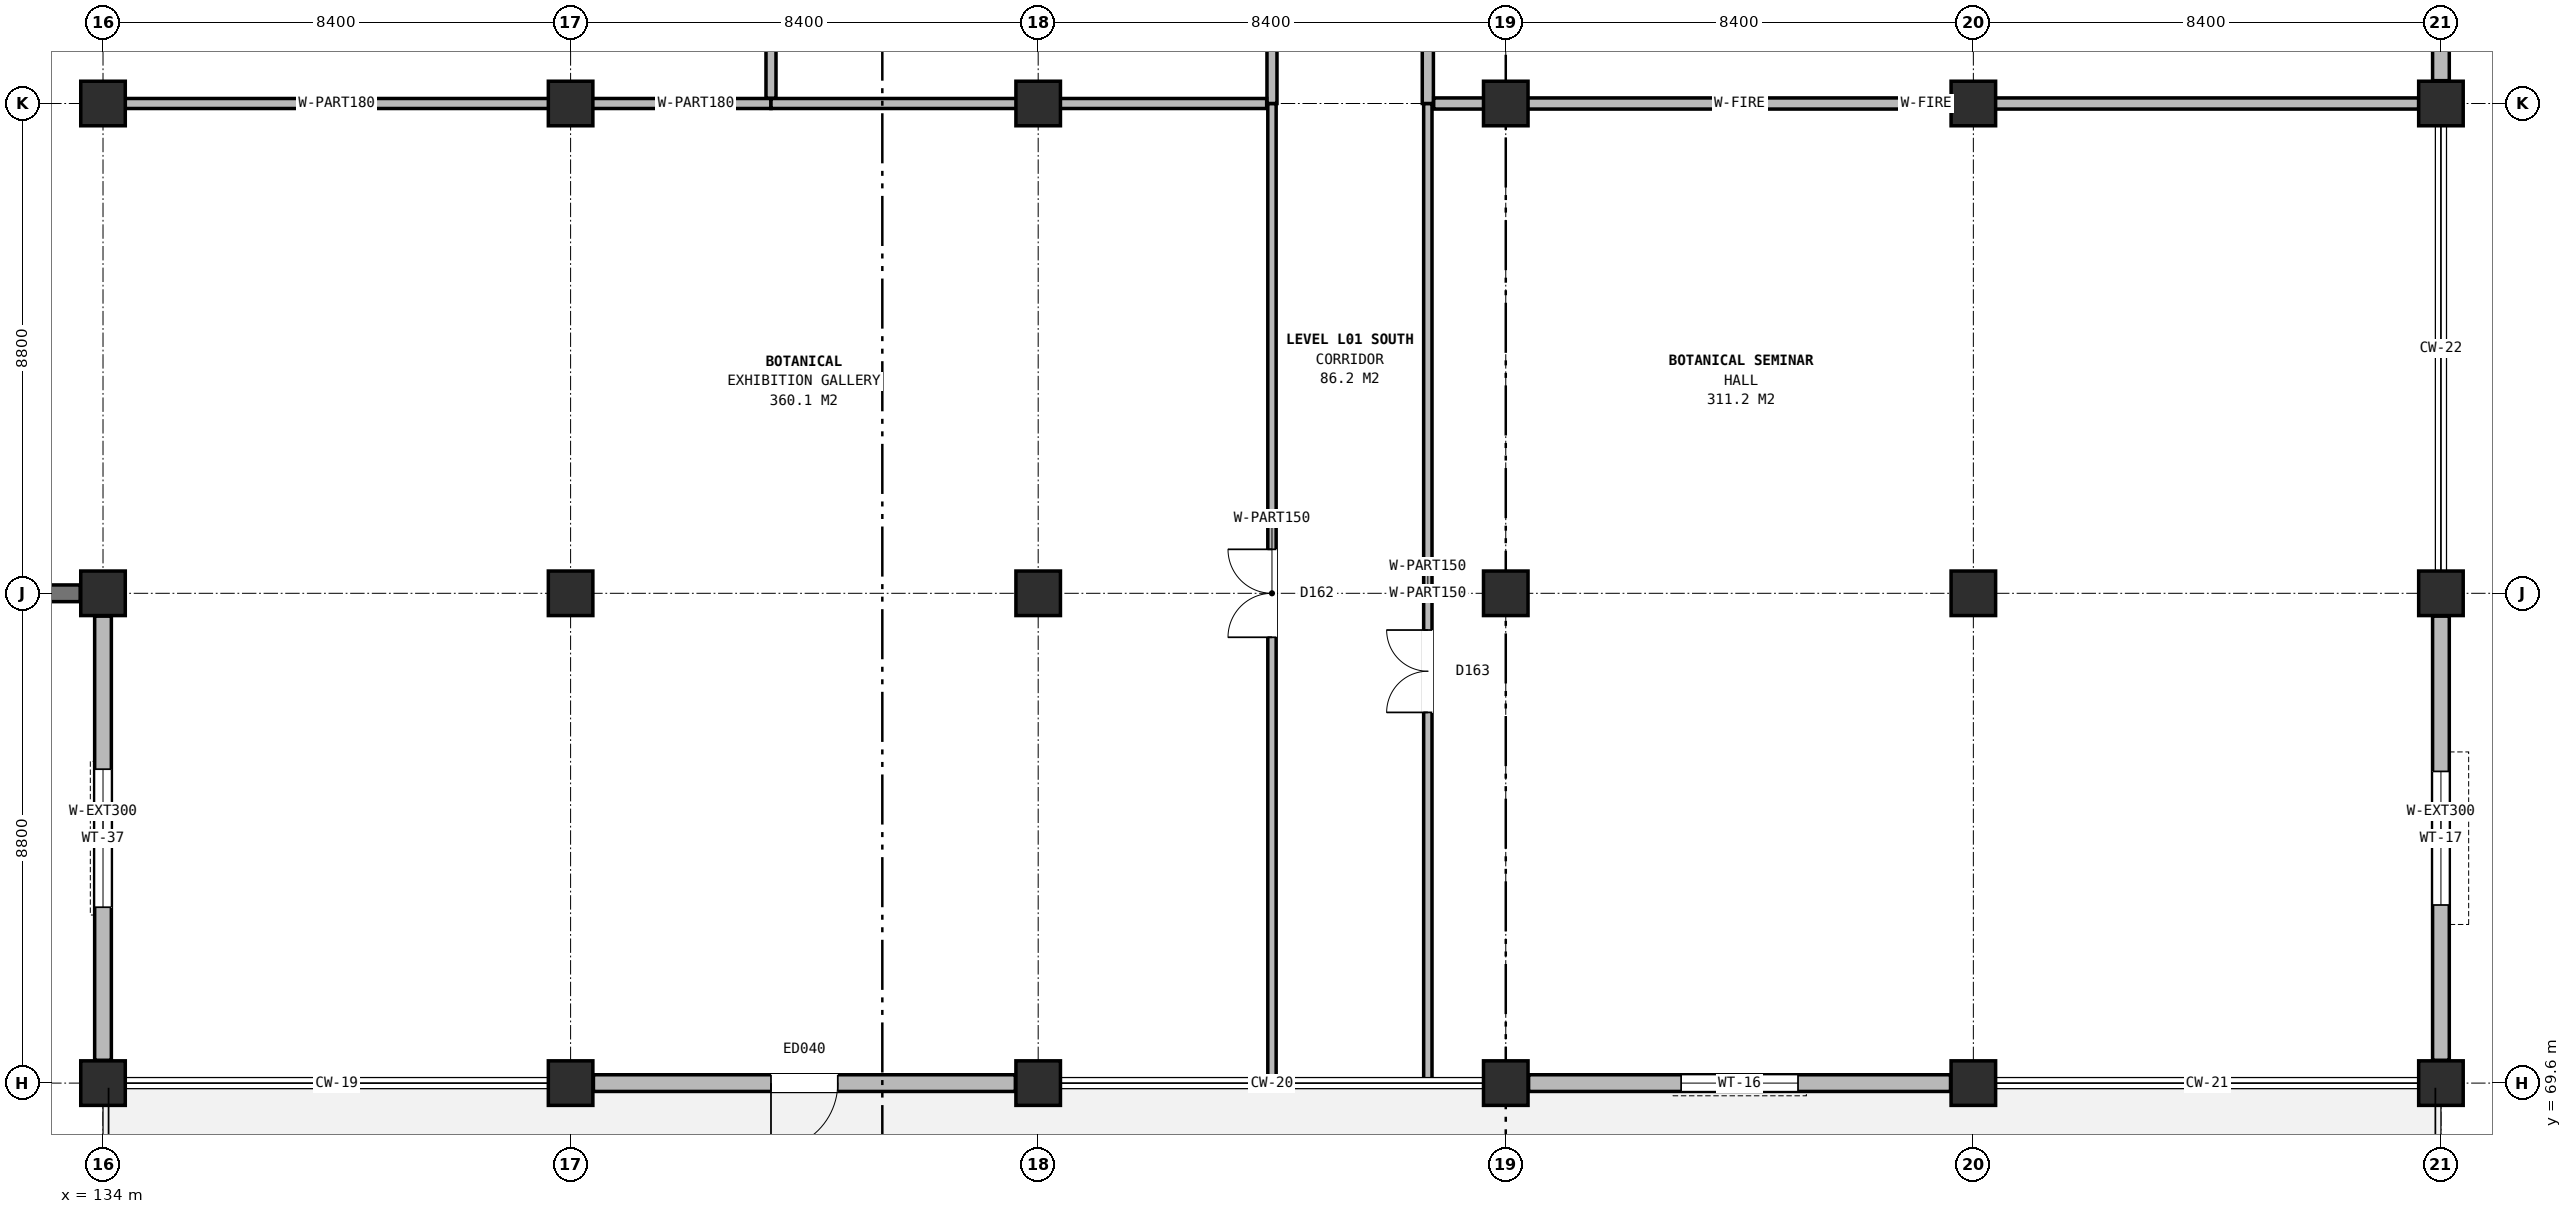
"""IFC4 building model, lengths in metres.
Left out: names, types, materials, properties, quantities, classifications, styles, units other than length and angle.
Written with IfcOpenShell. Run it as: python <this file> out.ifc"""

import sys

from ifc_helpers import new_model, si_unit, direction, frame, frame_2d, origin, origin_2d, place, context, subcontext, project, spatial, rectangle, extrude, element, fill, save


model = new_model("IFC4")
c1 = context("Model", 3, precision=1e-05, world=origin(), true_north=direction((0.0, 1.0)))
c2 = subcontext(c1, "Body", "Model", "MODEL_VIEW")
j1 = project(units=[si_unit("LENGTHUNIT", "METRE"), si_unit("PLANEANGLEUNIT", "RADIAN")], contexts=[c1])
p1 = place(None, origin())
s1 = spatial("IfcSite", under=j1, at=p1, CompositionType="ELEMENT")
p2 = place(p1, origin())
s2 = spatial("IfcBuilding", under=s1, at=p2, CompositionType="ELEMENT")
p3 = place(p2, frame((0.0, 0.0, 4.8)))
s3 = spatial("IfcBuildingStorey", under=s2, at=p3, CompositionType="ELEMENT", Elevation=4.8)
for number, where, z_axis, x_axis in (
    (1, (134.0, 69.6, 0.0), (0.0, 0.0, 1.0), (1.0, 0.0, 0.0)),
    (2, (134.0, 78.4, 0.0), (0.0, 0.0, 1.0), (1.0, 0.0, 0.0)),
    (3, (134.0, 87.2, 0.0), (0.0, 0.0, 1.0), (1.0, 0.0, 0.0)),
    (4, (142.4, 69.6, 0.0), (0.0, 0.0, 1.0), (1.0, 0.0, 0.0)),
    (5, (142.4, 78.4, 0.0), (0.0, 0.0, 1.0), (1.0, 0.0, 0.0)),
    (6, (142.4, 87.2, 0.0), (0.0, 0.0, 1.0), (1.0, 0.0, 0.0)),
    (7, (150.8, 69.6, 0.0), (0.0, 0.0, 1.0), (1.0, 0.0, 0.0)),
    (8, (150.8, 78.4, 0.0), (0.0, 0.0, 1.0), (1.0, 0.0, 0.0)),
    (9, (150.8, 87.2, 0.0), (0.0, 0.0, 1.0), (1.0, 0.0, 0.0)),
    (10, (159.2, 69.6, 0.0), (0.0, 0.0, 1.0), (1.0, 0.0, 0.0)),
    (11, (159.2, 78.4, 0.0), (0.0, 0.0, 1.0), (1.0, 0.0, 0.0)),
    (12, (159.2, 87.2, 0.0), (0.0, 0.0, 1.0), (1.0, 0.0, 0.0)),
    (13, (167.6, 69.6, 0.0), (0.0, 0.0, 1.0), (1.0, 0.0, 0.0)),
    (14, (167.6, 78.4, 0.0), (0.0, 0.0, 1.0), (1.0, 0.0, 0.0)),
    (15, (167.6, 87.2, 0.0), (0.0, 0.0, 1.0), (1.0, 0.0, 0.0)),
    (16, (176.0, 69.6, 0.0), (0.0, 0.0, 1.0), (1.0, 0.0, 0.0)),
    (17, (176.0, 78.4, 0.0), (0.0, 0.0, 1.0), (1.0, 0.0, 0.0)),
    (18, (176.0, 87.2, 0.0), (0.0, 0.0, 1.0), (1.0, 0.0, 0.0)),
):
    element("IfcColumn", number, at=place(p3, frame(where, z_axis=z_axis, x_axis=x_axis)), inside=s3, PredefinedType="COLUMN", context=c2, shape_type="SweptSolid", body=[
        extrude(rectangle(XDim=0.8, YDim=0.8, at=origin_2d()), origin(), (0.0, 0.0, 1.0), 4.2),
    ])
p4 = place(p3, frame((142.81, 69.6, 0.0), z_axis=(0.0, 0.0, 1.0), x_axis=(1.0, 0.0, 0.0)))
e19 = element("IfcWall", 19, at=p4, inside=s3, PredefinedType="SOLIDWALL", context=c2, shape_type="SweptSolid", body=[
    extrude(rectangle(XDim=7.58, YDim=0.3, at=frame_2d((3.79, 0.0))), origin(), (0.0, 0.0, 1.0), 3.45),
])
p5 = place(p4, frame((3.19, 0.0, 0.0)))
e20 = element("IfcOpeningElement", 20, at=p5, cuts=e19, PredefinedType="OPENING", context=c2, shape_type="SweptSolid", body=[
    extrude(rectangle(XDim=1.2, YDim=2.25, at=frame_2d((0.6, 1.125))), frame((0.0, 0.16, 0.0), z_axis=(0.0, -1.0, 0.0), x_axis=(1.0, 0.0, 0.0)), (0.0, 0.0, 1.0), 0.32),
])
p6 = place(p3, frame((159.61, 69.6, 0.0), z_axis=(0.0, 0.0, 1.0), x_axis=(1.0, 0.0, 0.0)))
e21 = element("IfcWall", 21, at=p6, inside=s3, PredefinedType="SOLIDWALL", context=c2, shape_type="SweptSolid", body=[
    extrude(rectangle(XDim=7.58, YDim=0.3, at=frame_2d((3.79, 0.0))), origin(), (0.0, 0.0, 1.0), 3.45),
])
p7 = place(p6, frame((2.74, 0.0, 0.9)))
e22 = element("IfcOpeningElement", 22, at=p7, cuts=e21, PredefinedType="OPENING", context=c2, shape_type="SweptSolid", body=[
    extrude(rectangle(XDim=2.1, YDim=2.3, at=frame_2d((1.05, 1.15))), frame((0.0, 0.16, 0.0), z_axis=(0.0, -1.0, 0.0), x_axis=(1.0, 0.0, 0.0)), (0.0, 0.0, 1.0), 0.32),
])
p8 = place(p3, frame((176.0, 70.01, 0.0), z_axis=(0.0, 0.0, 1.0), x_axis=(0.0, 1.0, 0.0)))
e23 = element("IfcWall", 23, at=p8, inside=s3, PredefinedType="SOLIDWALL", context=c2, shape_type="SweptSolid", body=[
    extrude(rectangle(XDim=7.98, YDim=0.3, at=frame_2d((3.99, 0.0))), origin(), (0.0, 0.0, 1.0), 3.45),
])
p9 = place(p8, frame((2.79, 0.0, 0.9)))
e24 = element("IfcOpeningElement", 24, at=p9, cuts=e23, PredefinedType="OPENING", context=c2, shape_type="SweptSolid", body=[
    extrude(rectangle(XDim=2.4, YDim=2.35, at=frame_2d((1.2, 1.175))), frame((0.0, 0.16, 0.0), z_axis=(0.0, -1.0, 0.0), x_axis=(1.0, 0.0, 0.0)), (0.0, 0.0, 1.0), 0.32),
])
p10 = place(p3, frame((176.0, 87.61, 0.0), z_axis=(0.0, 0.0, 1.0), x_axis=(0.0, 1.0, 0.0)))
e25 = element("IfcWall", 25, at=p10, inside=s3, PredefinedType="SOLIDWALL", context=c2, shape_type="SweptSolid", body=[
    extrude(rectangle(XDim=7.98, YDim=0.3, at=frame_2d((3.99, 0.0))), origin(), (0.0, 0.0, 1.0), 3.45),
])
p11 = place(p10, frame((2.64, 0.0, 0.9)))
e26 = element("IfcOpeningElement", 26, at=p11, cuts=e25, PredefinedType="OPENING", context=c2, shape_type="SweptSolid", body=[
    extrude(rectangle(XDim=2.7, YDim=2.35, at=frame_2d((1.35, 1.175))), frame((0.0, 0.16, 0.0), z_axis=(0.0, -1.0, 0.0), x_axis=(1.0, 0.0, 0.0)), (0.0, 0.0, 1.0), 0.32),
])
p12 = place(p3, frame((126.01, 78.4, 0.0), z_axis=(0.0, 0.0, 1.0), x_axis=(1.0, 0.0, 0.0)))
e27 = element("IfcWall", 27, at=p12, inside=s3, PredefinedType="SHEAR", context=c2, shape_type="SweptSolid", body=[
    extrude(rectangle(XDim=7.58, YDim=0.3, at=frame_2d((3.79, 0.0))), origin(), (0.0, 0.0, 1.0), 3.45),
])
p13 = place(p3, frame((134.0, 77.99, 0.0), z_axis=(0.0, 0.0, 1.0), x_axis=(0.0, -1.0, 0.0)))
e28 = element("IfcWall", 28, at=p13, inside=s3, PredefinedType="SOLIDWALL", context=c2, shape_type="SweptSolid", body=[
    extrude(rectangle(XDim=7.98, YDim=0.3, at=frame_2d((3.99, 0.0))), origin(), (0.0, 0.0, 1.0), 3.45),
])
p14 = place(p13, frame((2.75, 0.0, 0.9)))
e29 = element("IfcOpeningElement", 29, at=p14, cuts=e28, PredefinedType="OPENING", context=c2, shape_type="SweptSolid", body=[
    extrude(rectangle(XDim=2.48, YDim=2.08, at=frame_2d((1.24, 1.04))), frame((0.0, 0.16, 0.0), z_axis=(0.0, -1.0, 0.0), x_axis=(1.0, 0.0, 0.0)), (0.0, 0.0, 1.0), 0.32),
])
p15 = place(p3, frame((155.0, 69.6, 0.0), z_axis=(0.0, 0.0, 1.0), x_axis=(0.0, 1.0, 0.0)))
e30 = element("IfcWall", 30, at=p15, inside=s3, PredefinedType="PARTITIONING", context=c2, shape_type="SweptSolid", body=[
    extrude(rectangle(XDim=17.6, YDim=0.15, at=frame_2d((8.8, 0.0))), origin(), (0.0, 0.0, 1.0), 3.865),
])
p16 = place(p15, frame((8.01, 0.0, 0.0)))
e31 = element("IfcOpeningElement", 31, at=p16, cuts=e30, PredefinedType="OPENING", context=c2, shape_type="SweptSolid", body=[
    extrude(rectangle(XDim=1.58, YDim=2.25, at=frame_2d((0.79, 1.125))), frame((0.0, 0.085, 0.0), z_axis=(0.0, -1.0, 0.0), x_axis=(1.0, 0.0, 0.0)), (0.0, 0.0, 1.0), 0.17),
])
p17 = place(p3, frame((157.8, 69.6, 0.0), z_axis=(0.0, 0.0, 1.0), x_axis=(0.0, 1.0, 0.0)))
e32 = element("IfcWall", 32, at=p17, inside=s3, PredefinedType="PARTITIONING", context=c2, shape_type="SweptSolid", body=[
    extrude(rectangle(XDim=17.6, YDim=0.15, at=frame_2d((8.8, 0.0))), origin(), (0.0, 0.0, 1.0), 3.865),
])
p18 = place(p17, frame((6.66, 0.0, 0.0)))
e33 = element("IfcOpeningElement", 33, at=p18, cuts=e32, PredefinedType="OPENING", context=c2, shape_type="SweptSolid", body=[
    extrude(rectangle(XDim=1.48, YDim=2.2, at=frame_2d((0.74, 1.1))), frame((0.0, 0.085, 0.0), z_axis=(0.0, -1.0, 0.0), x_axis=(1.0, 0.0, 0.0)), (0.0, 0.0, 1.0), 0.17),
])
p19 = place(p3, frame((155.0, 87.2, 0.0), z_axis=(0.0, 0.0, 1.0), x_axis=(0.0, 1.0, 0.0)))
e34 = element("IfcWall", 34, at=p19, inside=s3, PredefinedType="PARTITIONING", context=c2, shape_type="SweptSolid", body=[
    extrude(rectangle(XDim=15.105, YDim=0.18, at=frame_2d((7.552, 0.0))), origin(), (0.0, 0.0, 1.0), 3.865),
])
p20 = place(p3, frame((157.8, 87.2, 0.0), z_axis=(0.0, 0.0, 1.0), x_axis=(0.0, 1.0, 0.0)))
e35 = element("IfcWall", 35, at=p20, inside=s3, PredefinedType="PARTITIONING", context=c2, shape_type="SweptSolid", body=[
    extrude(rectangle(XDim=15.095, YDim=0.2, at=frame_2d((7.547, 0.0))), origin(), (0.0, 0.0, 1.0), 3.865),
])
p21 = place(p3, frame((134.4, 87.2, 0.0), z_axis=(0.0, 0.0, 1.0), x_axis=(1.0, 0.0, 0.0)))
e36 = element("IfcWall", 36, at=p21, inside=s3, PredefinedType="PARTITIONING", context=c2, shape_type="SweptSolid", body=[
    extrude(rectangle(XDim=11.6, YDim=0.18, at=frame_2d((5.8, 0.0))), origin(), (0.0, 0.0, 1.0), 3.445),
])
p22 = place(p3, frame((146.0, 87.2, 0.0), z_axis=(0.0, 0.0, 1.0), x_axis=(1.0, 0.0, 0.0)))
e37 = element("IfcWall", 37, at=p22, inside=s3, PredefinedType="PARTITIONING", context=c2, shape_type="SweptSolid", body=[
    extrude(rectangle(XDim=8.905, YDim=0.18, at=frame_2d((4.453, 0.0))), origin(), (0.0, 0.0, 1.0), 3.445),
])
p23 = place(p3, frame((157.905, 87.2, 0.0), z_axis=(0.0, 0.0, 1.0), x_axis=(1.0, 0.0, 0.0)))
e38 = element("IfcWall", 38, at=p23, inside=s3, PredefinedType="PARTITIONING", context=c2, shape_type="SweptSolid", body=[
    extrude(rectangle(XDim=17.695, YDim=0.2, at=frame_2d((8.848, 0.0))), origin(), (0.0, 0.0, 1.0), 3.445),
])
p24 = place(p3, frame((146.0, 87.295, 0.0), z_axis=(0.0, 0.0, 1.0), x_axis=(0.0, 1.0, 0.0)))
e39 = element("IfcWall", 39, at=p24, inside=s3, PredefinedType="PARTITIONING", context=c2, shape_type="SweptSolid", body=[
    extrude(rectangle(XDim=15.01, YDim=0.18, at=frame_2d((7.505, 0.0))), origin(), (0.0, 0.0, 1.0), 3.865),
])
p25 = place(p5, frame((1.2, 0.0, 0.0), z_axis=(0.0, 0.0, 1.0), x_axis=(-1.0, 0.0, 0.0)))
e40 = element("IfcDoor", 40, at=p25, inside=s3, OperationType="SINGLE_SWING_LEFT", PredefinedType="DOOR", context=c2, shape_type="SweptSolid", body=[
    extrude(rectangle(XDim=1.2, YDim=2.25, at=frame_2d((0.6, 1.125))), frame((0.0, 0.025, 0.0), z_axis=(0.0, -1.0, 0.0), x_axis=(1.0, 0.0, 0.0)), (0.0, 0.0, 1.0), 0.05),
])
fill(e20, e40)
p26 = place(p7, origin())
e41 = element("IfcWindow", 41, at=p26, inside=s3, PartitioningType="SINGLE_PANEL", PredefinedType="WINDOW", context=c2, shape_type="SweptSolid", body=[
    extrude(rectangle(XDim=2.1, YDim=2.3, at=frame_2d((1.05, 1.15))), frame((0.0, 0.03, 0.0), z_axis=(0.0, -1.0, 0.0), x_axis=(1.0, 0.0, 0.0)), (0.0, 0.0, 1.0), 0.06),
])
fill(e22, e41)
p27 = place(p9, origin())
e42 = element("IfcWindow", 42, at=p27, inside=s3, PartitioningType="SINGLE_PANEL", PredefinedType="WINDOW", context=c2, shape_type="SweptSolid", body=[
    extrude(rectangle(XDim=2.4, YDim=2.35, at=frame_2d((1.2, 1.175))), frame((0.0, 0.03, 0.0), z_axis=(0.0, -1.0, 0.0), x_axis=(1.0, 0.0, 0.0)), (0.0, 0.0, 1.0), 0.06),
])
fill(e24, e42)
p28 = place(p14, origin())
e43 = element("IfcWindow", 43, at=p28, inside=s3, PartitioningType="SINGLE_PANEL", PredefinedType="WINDOW", context=c2, shape_type="SweptSolid", body=[
    extrude(rectangle(XDim=2.48, YDim=2.08, at=frame_2d((1.24, 1.04))), frame((0.0, 0.03, 0.0), z_axis=(0.0, -1.0, 0.0), x_axis=(1.0, 0.0, 0.0)), (0.0, 0.0, 1.0), 0.06),
])
fill(e29, e43)
p29 = place(p16, origin())
e44 = element("IfcDoor", 44, at=p29, inside=s3, OperationType="DOUBLE_DOOR_SINGLE_SWING", PredefinedType="DOOR", context=c2, shape_type="SweptSolid", body=[
    extrude(rectangle(XDim=1.58, YDim=2.25, at=frame_2d((0.79, 1.125))), frame((0.0, 0.025, 0.0), z_axis=(0.0, -1.0, 0.0), x_axis=(1.0, 0.0, 0.0)), (0.0, 0.0, 1.0), 0.05),
])
fill(e31, e44)
p30 = place(p18, origin())
e45 = element("IfcDoor", 45, at=p30, inside=s3, OperationType="DOUBLE_DOOR_SINGLE_SWING", PredefinedType="DOOR", context=c2, shape_type="SweptSolid", body=[
    extrude(rectangle(XDim=1.48, YDim=2.2, at=frame_2d((0.74, 1.1))), frame((0.0, 0.025, 0.0), z_axis=(0.0, -1.0, 0.0), x_axis=(1.0, 0.0, 0.0)), (0.0, 0.0, 1.0), 0.05),
])
fill(e33, e45)
save(model, sys.argv[1])
